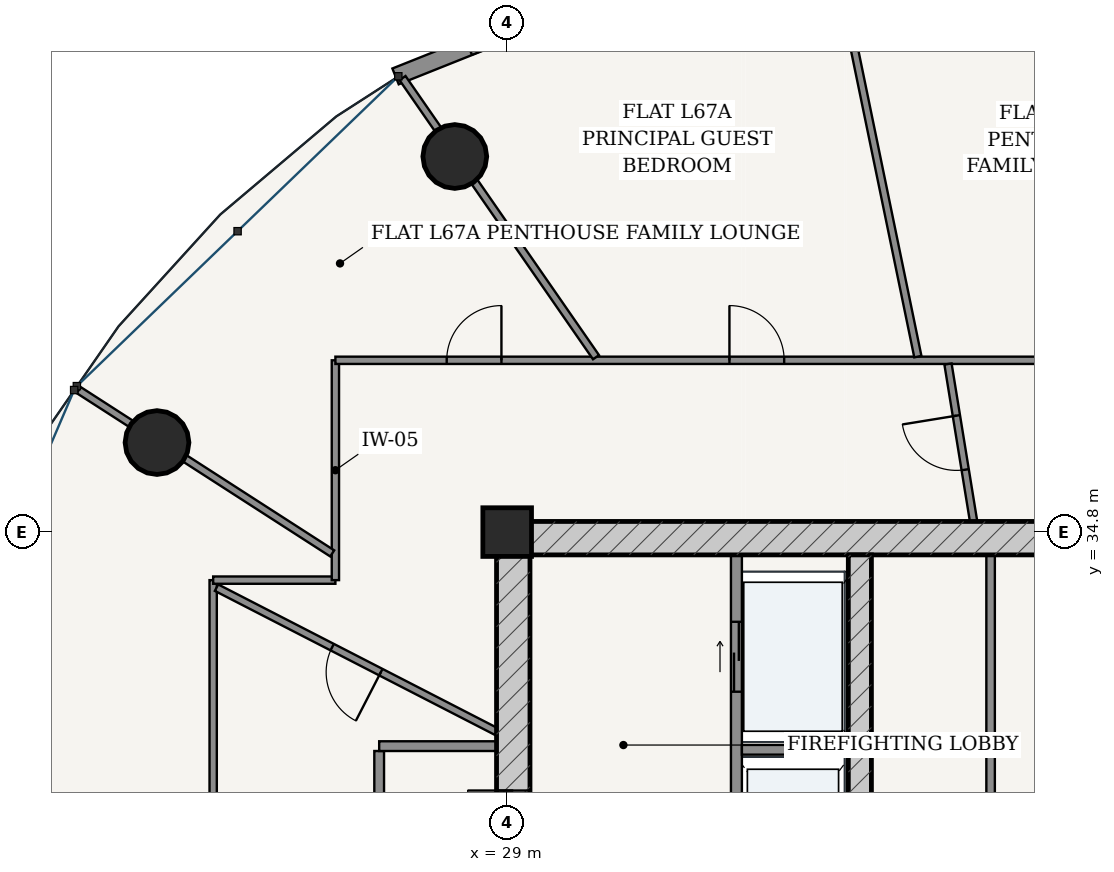
"""IFC4 building model, lengths in metres.
Left out: names, types, materials, properties, quantities, classifications, styles, units other than length and angle.
Written with IfcOpenShell. Run it as: python <this file> out.ifc"""

import sys

from ifc_helpers import new_model, si_unit, direction, frame, frame_2d, origin, origin_2d, place, context, subcontext, project, spatial, rectangle, hollow_circle, extrude, source, transform, mapped, element, fill, save


model = new_model("IFC4")
c1 = context("Model", 3, precision=1e-05, world=origin(), true_north=direction((-0.2419218956, 0.970295726276)))
c2 = subcontext(c1, "Body", "Model", "MODEL_VIEW")
j1 = project(units=[si_unit("LENGTHUNIT", "METRE"), si_unit("PLANEANGLEUNIT", "RADIAN")], contexts=[c1])
p1 = place(None, origin())
s1 = spatial("IfcSite", under=j1, at=p1, CompositionType="ELEMENT")
p2 = place(p1, origin())
s2 = spatial("IfcBuilding", under=s1, at=p2, CompositionType="ELEMENT")
p3 = place(p2, frame((0.0, 0.0, 255.7)))
s3 = spatial("IfcBuildingStorey", under=s2, at=p3, CompositionType="ELEMENT", Elevation=255.7)
p4 = place(p3, frame((29.0, 34.8, 0.0), z_axis=(0.0, 0.0, 1.0), x_axis=(1.0, 0.0, 0.0)))
e1 = element("IfcColumn", 1, at=p4, inside=s3, PredefinedType="COLUMN", context=c2, shape_type="SweptSolid", body=[
    extrude(rectangle(XDim=0.8, YDim=0.8, at=origin_2d()), origin(), (0.0, 0.0, 1.0), 3.75),
])
p5 = place(p3, frame((28.825, 34.7, 0.0), z_axis=(0.0, 0.0, 1.0), x_axis=(1.0, 0.0, 0.0)))
e2 = element("IfcWall", 2, at=p5, inside=s3, PredefinedType="SHEAR", context=c2, shape_type="SweptSolid", body=[
    extrude(rectangle(XDim=18.35, YDim=0.55, at=frame_2d((9.175, 0.0))), origin(), (0.0, 0.0, 1.0), 3.49),
])
p6 = place(p3, frame((29.1, 19.175, 0.0), z_axis=(0.0, 0.0, 1.0), x_axis=(0.0, 1.0, 0.0)))
e3 = element("IfcWall", 3, at=p6, inside=s3, PredefinedType="SHEAR", context=c2, shape_type="SweptSolid", body=[
    extrude(rectangle(XDim=15.25, YDim=0.55, at=frame_2d((7.625, 0.0))), origin(), (0.0, 0.0, 1.0), 3.49),
])
p7 = place(p6, frame((9.875, 0.0, 0.0)))
e4 = element("IfcOpeningElement", 4, at=p7, cuts=e3, PredefinedType="OPENING", context=c2, shape_type="SweptSolid", body=[
    extrude(rectangle(XDim=1.5, YDim=2.2, at=frame_2d((0.75, 1.1))), frame((0.0, 0.285, 0.0), z_axis=(0.0, -1.0, 0.0), x_axis=(1.0, 0.0, 0.0)), (0.0, 0.0, 1.0), 0.57),
])
p8 = place(p3, frame((34.8, 19.175, 0.0), z_axis=(0.0, 0.0, 1.0), x_axis=(0.0, 1.0, 0.0)))
e5 = element("IfcWall", 5, at=p8, inside=s3, PredefinedType="SHEAR", context=c2, shape_type="SweptSolid", body=[
    extrude(rectangle(XDim=15.25, YDim=0.38, at=frame_2d((7.625, 0.0))), origin(), (0.0, 0.0, 1.0), 3.49),
])
p9 = place(p8, frame((7.8, 0.0, 0.0)))
e6 = element("IfcOpeningElement", 6, at=p9, cuts=e5, PredefinedType="OPENING", context=c2, shape_type="SweptSolid", body=[
    extrude(rectangle(XDim=1.05, YDim=2.15, at=frame_2d((0.525, 1.075))), frame((0.0, 0.2, 0.0), z_axis=(0.0, -1.0, 0.0), x_axis=(1.0, 0.0, 0.0)), (0.0, 0.0, 1.0), 0.4),
])
for number, where, z_axis, x_axis in (
    (7, (28.139, 40.977, 0.0), (0.0, 0.0, 1.0), (1.0, 0.0, 0.0)),
    (8, (23.241, 36.272, 0.0), (0.0, 0.0, 1.0), (1.0, 0.0, 0.0)),
):
    element("IfcColumn", number, at=place(p3, frame(where, z_axis=z_axis, x_axis=x_axis)), inside=s3, PredefinedType="COLUMN", context=c2, shape_type="SweptSolid", body=[
        extrude(hollow_circle(Radius=0.525, WallThickness=0.035, at=origin_2d()), origin(), (0.0, 0.0, 1.0), 3.75),
    ])
p10 = place(p3, frame((34.295, 45.141, 0.0), z_axis=(0.0, 0.0, 1.0), x_axis=(-0.928724272392, -0.370771123296, 0.0)))
e9 = element("IfcWall", 9, at=p10, inside=s3, PredefinedType="SOLIDWALL", context=c2, shape_type="SweptSolid", body=[
    extrude(rectangle(XDim=7.678, YDim=0.28, at=frame_2d((3.839, 0.0))), origin(), (0.0, 0.0, 1.0), 3.49),
])
p11 = place(p10, frame((1.298, 0.0, 0.85)))
e10 = element("IfcOpeningElement", 10, at=p11, cuts=e9, PredefinedType="OPENING", context=c2, shape_type="SweptSolid", body=[
    extrude(rectangle(XDim=1.55, YDim=1.95, at=frame_2d((0.775, 0.975))), frame((0.0, 0.15, 0.0), z_axis=(0.0, -1.0, 0.0), x_axis=(1.0, 0.0, 0.0)), (0.0, 0.0, 1.0), 0.3),
])
p12 = place(p10, frame((4.83, 0.0, 0.85)))
e11 = element("IfcOpeningElement", 11, at=p12, cuts=e9, PredefinedType="OPENING", context=c2, shape_type="SweptSolid", body=[
    extrude(rectangle(XDim=1.55, YDim=1.95, at=frame_2d((0.775, 0.975))), frame((0.0, 0.15, 0.0), z_axis=(0.0, -1.0, 0.0), x_axis=(1.0, 0.0, 0.0)), (0.0, 0.0, 1.0), 0.3),
])
p13 = place(p3, frame((32.77, 28.52, 0.0), z_axis=(0.0, 0.0, 1.0), x_axis=(0.0, 1.0, 0.0)))
e12 = element("IfcWall", 12, at=p13, inside=s3, PredefinedType="PARTITIONING", context=c2, shape_type="SweptSolid", body=[
    extrude(rectangle(XDim=5.905, YDim=0.18, at=frame_2d((2.953, 0.0))), origin(), (0.0, 0.0, 1.0), 3.49),
])
p14 = place(p13, frame((3.655, 0.0, 0.0)))
e13 = element("IfcOpeningElement", 13, at=p14, cuts=e12, PredefinedType="OPENING", context=c2, shape_type="SweptSolid", body=[
    extrude(rectangle(XDim=1.15, YDim=2.2, at=frame_2d((0.575, 1.1))), frame((0.0, 0.1, 0.0), z_axis=(0.0, -1.0, 0.0), x_axis=(1.0, 0.0, 0.0)), (0.0, 0.0, 1.0), 0.2),
])
p15 = place(p13, frame((0.73, 0.0, 0.0)))
e14 = element("IfcOpeningElement", 14, at=p15, cuts=e12, PredefinedType="OPENING", context=c2, shape_type="SweptSolid", body=[
    extrude(rectangle(XDim=1.2, YDim=2.25, at=frame_2d((0.6, 1.125))), frame((0.0, 0.1, 0.0), z_axis=(0.0, -1.0, 0.0), x_axis=(1.0, 0.0, 0.0)), (0.0, 0.0, 1.0), 0.2),
])
p16 = place(p3, frame((32.86, 31.22, 0.0), z_axis=(0.0, 0.0, 1.0), x_axis=(1.0, 0.0, 0.0)))
e15 = element("IfcWall", 15, at=p16, inside=s3, PredefinedType="PARTITIONING", context=c2, shape_type="SweptSolid", body=[
    extrude(rectangle(XDim=1.75, YDim=0.16, at=frame_2d((0.875, 0.0))), origin(), (0.0, 0.0, 1.0), 3.49),
])
p17 = place(p3, frame((36.95, 28.56, 0.0), z_axis=(0.0, 0.0, 1.0), x_axis=(0.0, 1.0, 0.0)))
e16 = element("IfcWall", 16, at=p17, inside=s3, PredefinedType="PARTITIONING", context=c2, shape_type="SweptSolid", body=[
    extrude(rectangle(XDim=5.865, YDim=0.14, at=frame_2d((2.933, 0.0))), origin(), (0.0, 0.0, 1.0), 3.49),
])
p18 = place(p3, frame((26.895, 17.275, 0.0), z_axis=(0.0, 0.0, 1.0), x_axis=(0.0, 1.0, 0.0)))
e17 = element("IfcWall", 17, at=p18, inside=s3, PredefinedType="PARTITIONING", context=c2, shape_type="SweptSolid", body=[
    extrude(rectangle(XDim=13.925, YDim=0.16, at=frame_2d((6.962, 0.0))), origin(), (0.0, 0.0, 1.0), 3.015),
])
p19 = place(p3, frame((26.895, 31.28, 0.0), z_axis=(0.0, 0.0, 1.0), x_axis=(1.0, 0.0, 0.0)))
e18 = element("IfcWall", 18, at=p19, inside=s3, PredefinedType="PARTITIONING", context=c2, shape_type="SweptSolid", body=[
    extrude(rectangle(XDim=1.93, YDim=0.16, at=frame_2d((0.965, 0.0))), origin(), (0.0, 0.0, 1.0), 3.49),
])
p20 = place(p3, frame((24.165, 24.249, 0.0), z_axis=(0.0, 0.0, 1.0), x_axis=(0.0, 1.0, 0.0)))
e19 = element("IfcWall", 19, at=p20, inside=s3, PredefinedType="PARTITIONING", context=c2, shape_type="SweptSolid", body=[
    extrude(rectangle(XDim=9.761, YDim=0.12, at=frame_2d((4.88, 0.0))), origin(), (0.0, 0.0, 1.0), 3.015),
])
p21 = place(p20, frame((4.43, 0.0, 0.0)))
e20 = element("IfcOpeningElement", 20, at=p21, cuts=e19, PredefinedType="OPENING", context=c2, shape_type="SweptSolid", body=[
    extrude(rectangle(XDim=0.9, YDim=2.15, at=frame_2d((0.45, 1.075))), frame((0.0, 0.07, 0.0), z_axis=(0.0, -1.0, 0.0), x_axis=(1.0, 0.0, 0.0)), (0.0, 0.0, 1.0), 0.14),
])
p22 = place(p3, frame((24.165, 34.01, 0.0), z_axis=(0.0, 0.0, 1.0), x_axis=(1.0, 0.0, 0.0)))
e21 = element("IfcWall", 21, at=p22, inside=s3, PredefinedType="PARTITIONING", context=c2, shape_type="SweptSolid", body=[
    extrude(rectangle(XDim=2.01, YDim=0.12, at=frame_2d((1.005, 0.0))), origin(), (0.0, 0.0, 1.0), 3.209),
])
p23 = place(p3, frame((26.175, 34.01, 0.0), z_axis=(0.0, 0.0, 1.0), x_axis=(0.0, 1.0, 0.0)))
e22 = element("IfcWall", 22, at=p23, inside=s3, PredefinedType="PARTITIONING", context=c2, shape_type="SweptSolid", body=[
    extrude(rectangle(XDim=3.615, YDim=0.12, at=frame_2d((1.808, 0.0))), origin(), (0.0, 0.0, 1.0), 3.015),
])
p24 = place(p3, frame((26.175, 37.625, 0.0), z_axis=(0.0, 0.0, 1.0), x_axis=(1.0, 0.0, 0.0)))
e23 = element("IfcWall", 23, at=p24, inside=s3, PredefinedType="PARTITIONING", context=c2, shape_type="SweptSolid", body=[
    extrude(rectangle(XDim=23.65, YDim=0.12, at=frame_2d((11.825, 0.0))), origin(), (0.0, 0.0, 1.0), 3.015),
])
p25 = place(p24, frame((12.791, 0.0, 0.0)))
e24 = element("IfcOpeningElement", 24, at=p25, cuts=e23, PredefinedType="OPENING", context=c2, shape_type="SweptSolid", body=[
    extrude(rectangle(XDim=0.9, YDim=2.15, at=frame_2d((0.45, 1.075))), frame((0.0, 0.07, 0.0), z_axis=(0.0, -1.0, 0.0), x_axis=(1.0, 0.0, 0.0)), (0.0, 0.0, 1.0), 0.14),
])
p26 = place(p24, frame((6.48, 0.0, 0.0)))
e25 = element("IfcOpeningElement", 25, at=p26, cuts=e23, PredefinedType="OPENING", context=c2, shape_type="SweptSolid", body=[
    extrude(rectangle(XDim=0.9, YDim=2.15, at=frame_2d((0.45, 1.075))), frame((0.0, 0.07, 0.0), z_axis=(0.0, -1.0, 0.0), x_axis=(1.0, 0.0, 0.0)), (0.0, 0.0, 1.0), 0.14),
])
p27 = place(p24, frame((1.831, 0.0, 0.0)))
e26 = element("IfcOpeningElement", 26, at=p27, cuts=e23, PredefinedType="OPENING", context=c2, shape_type="SweptSolid", body=[
    extrude(rectangle(XDim=0.9, YDim=2.15, at=frame_2d((0.45, 1.075))), frame((0.0, 0.07, 0.0), z_axis=(0.0, -1.0, 0.0), x_axis=(1.0, 0.0, 0.0)), (0.0, 0.0, 1.0), 0.14),
])
p28 = place(p3, frame((35.754, 37.686, 0.0), z_axis=(0.0, 0.0, 1.0), x_axis=(-0.202105877204, 0.979363678313, 0.0)))
e27 = element("IfcWall", 27, at=p28, inside=s3, PredefinedType="PARTITIONING", context=c2, shape_type="SweptSolid", body=[
    extrude(rectangle(XDim=7.512, YDim=0.12, at=frame_2d((3.756, 0.0))), origin(), (0.0, 0.0, 1.0), 3.015),
])
p29 = place(p3, frame((30.461, 37.676, 0.0), z_axis=(0.0, 0.0, 1.0), x_axis=(-0.569689482466, 0.821860020665, 0.0)))
e28 = element("IfcWall", 28, at=p29, inside=s3, PredefinedType="PARTITIONING", context=c2, shape_type="SweptSolid", body=[
    extrude(rectangle(XDim=5.585, YDim=0.12, at=frame_2d((2.792, 0.0))), origin(), (0.0, 0.0, 1.0), 3.015),
])
p30 = place(p3, frame((26.123, 34.45, 0.0), z_axis=(0.0, 0.0, 1.0), x_axis=(-0.840703033126, 0.541496454367, 0.0)))
e29 = element("IfcWall", 29, at=p30, inside=s3, PredefinedType="PARTITIONING", context=c2, shape_type="SweptSolid", body=[
    extrude(rectangle(XDim=4.958, YDim=0.12, at=frame_2d((2.479, 0.0))), origin(), (0.0, 0.0, 1.0), 3.015),
])
p31 = place(p3, frame((36.67, 34.977, 0.0), z_axis=(0.0, 0.0, 1.0), x_axis=(-0.160605953374, 0.98701860557, 0.0)))
e30 = element("IfcWall", 30, at=p31, inside=s3, PredefinedType="PARTITIONING", context=c2, shape_type="SweptSolid", body=[
    extrude(rectangle(XDim=2.621, YDim=0.12, at=frame_2d((1.31, 0.0))), origin(), (0.0, 0.0, 1.0), 2.575),
])
p32 = place(p31, frame((0.86, 0.0, 0.0)))
e31 = element("IfcOpeningElement", 31, at=p32, cuts=e30, PredefinedType="OPENING", context=c2, shape_type="SweptSolid", body=[
    extrude(rectangle(XDim=0.9, YDim=2.15, at=frame_2d((0.45, 1.075))), frame((0.0, 0.07, 0.0), z_axis=(0.0, -1.0, 0.0), x_axis=(1.0, 0.0, 0.0)), (0.0, 0.0, 1.0), 0.14),
])
p33 = place(p3, frame((28.825, 31.518, 0.0), z_axis=(0.0, 0.0, 1.0), x_axis=(-0.889305882583, 0.457312854842, 0.0)))
e32 = element("IfcWall", 32, at=p33, inside=s3, PredefinedType="PARTITIONING", context=c2, shape_type="SweptSolid", body=[
    extrude(rectangle(XDim=5.178, YDim=0.12, at=frame_2d((2.589, 0.0))), origin(), (0.0, 0.0, 1.0), 3.209),
])
p34 = place(p33, frame((2.139, 0.0, 0.0)))
e33 = element("IfcOpeningElement", 33, at=p34, cuts=e32, PredefinedType="OPENING", context=c2, shape_type="SweptSolid", body=[
    extrude(rectangle(XDim=0.9, YDim=2.15, at=frame_2d((0.45, 1.075))), frame((0.0, 0.07, 0.0), z_axis=(0.0, -1.0, 0.0), x_axis=(1.0, 0.0, 0.0)), (0.0, 0.0, 1.0), 0.14),
])
m1 = source(origin(), c2, "Body", "SweptSolid", [
    extrude(rectangle(XDim=1.5, YDim=2.2, at=frame_2d((0.75, 1.1))), frame((0.0, 0.025, 0.0), z_axis=(0.0, -1.0, 0.0), x_axis=(1.0, 0.0, 0.0)), (0.0, 0.0, 1.0), 0.05),
])
p35 = place(p7, origin())
e34 = element("IfcDoor", 34, at=p35, inside=s3, OperationType="DOUBLE_DOOR_SINGLE_SWING", PredefinedType="DOOR", context=c2, shape_type="MappedRepresentation", body=[
    mapped(m1, transform((0.0, 0.0, 0.0), scale=1.0)),
])
fill(e4, e34)
m2 = source(origin(), c2, "Body", "SweptSolid", [
    extrude(rectangle(XDim=1.15, YDim=2.2, at=frame_2d((0.575, 1.1))), frame((0.0, 0.025, 0.0), z_axis=(0.0, -1.0, 0.0), x_axis=(1.0, 0.0, 0.0)), (0.0, 0.0, 1.0), 0.05),
])
p36 = place(p14, origin())
e35 = element("IfcDoor", 35, at=p36, inside=s3, OperationType="DOUBLE_DOOR_SLIDING", PredefinedType="DOOR", context=c2, shape_type="MappedRepresentation", body=[
    mapped(m2, transform((0.0, 0.0, 0.0), scale=1.0)),
])
fill(e13, e35)
m3 = source(origin(), c2, "Body", "SweptSolid", [
    extrude(rectangle(XDim=0.9, YDim=2.15, at=frame_2d((0.45, 1.075))), frame((0.0, 0.025, 0.0), z_axis=(0.0, -1.0, 0.0), x_axis=(1.0, 0.0, 0.0)), (0.0, 0.0, 1.0), 0.05),
])
p37 = place(p32, origin())
e36 = element("IfcDoor", 36, at=p37, inside=s3, OperationType="SINGLE_SWING_RIGHT", PredefinedType="DOOR", context=c2, shape_type="MappedRepresentation", body=[
    mapped(m3, transform((0.0, 0.0, 0.0), scale=1.0)),
])
fill(e31, e36)
p38 = place(p34, origin())
e37 = element("IfcDoor", 37, at=p38, inside=s3, OperationType="SINGLE_SWING_LEFT", PredefinedType="DOOR", context=c2, shape_type="MappedRepresentation", body=[
    mapped(m3, transform((0.0, 0.0, 0.0), scale=1.0)),
])
fill(e33, e37)
p39 = place(p26, origin())
e38 = element("IfcDoor", 38, at=p39, inside=s3, OperationType="SINGLE_SWING_LEFT", PredefinedType="DOOR", context=c2, shape_type="MappedRepresentation", body=[
    mapped(m3, transform((0.0, 0.0, 0.0), scale=1.0)),
])
fill(e25, e38)
p40 = place(p27, origin())
e39 = element("IfcDoor", 39, at=p40, inside=s3, OperationType="SINGLE_SWING_RIGHT", PredefinedType="DOOR", context=c2, shape_type="MappedRepresentation", body=[
    mapped(m3, transform((0.0, 0.0, 0.0), scale=1.0)),
])
fill(e26, e39)
save(model, sys.argv[1])
